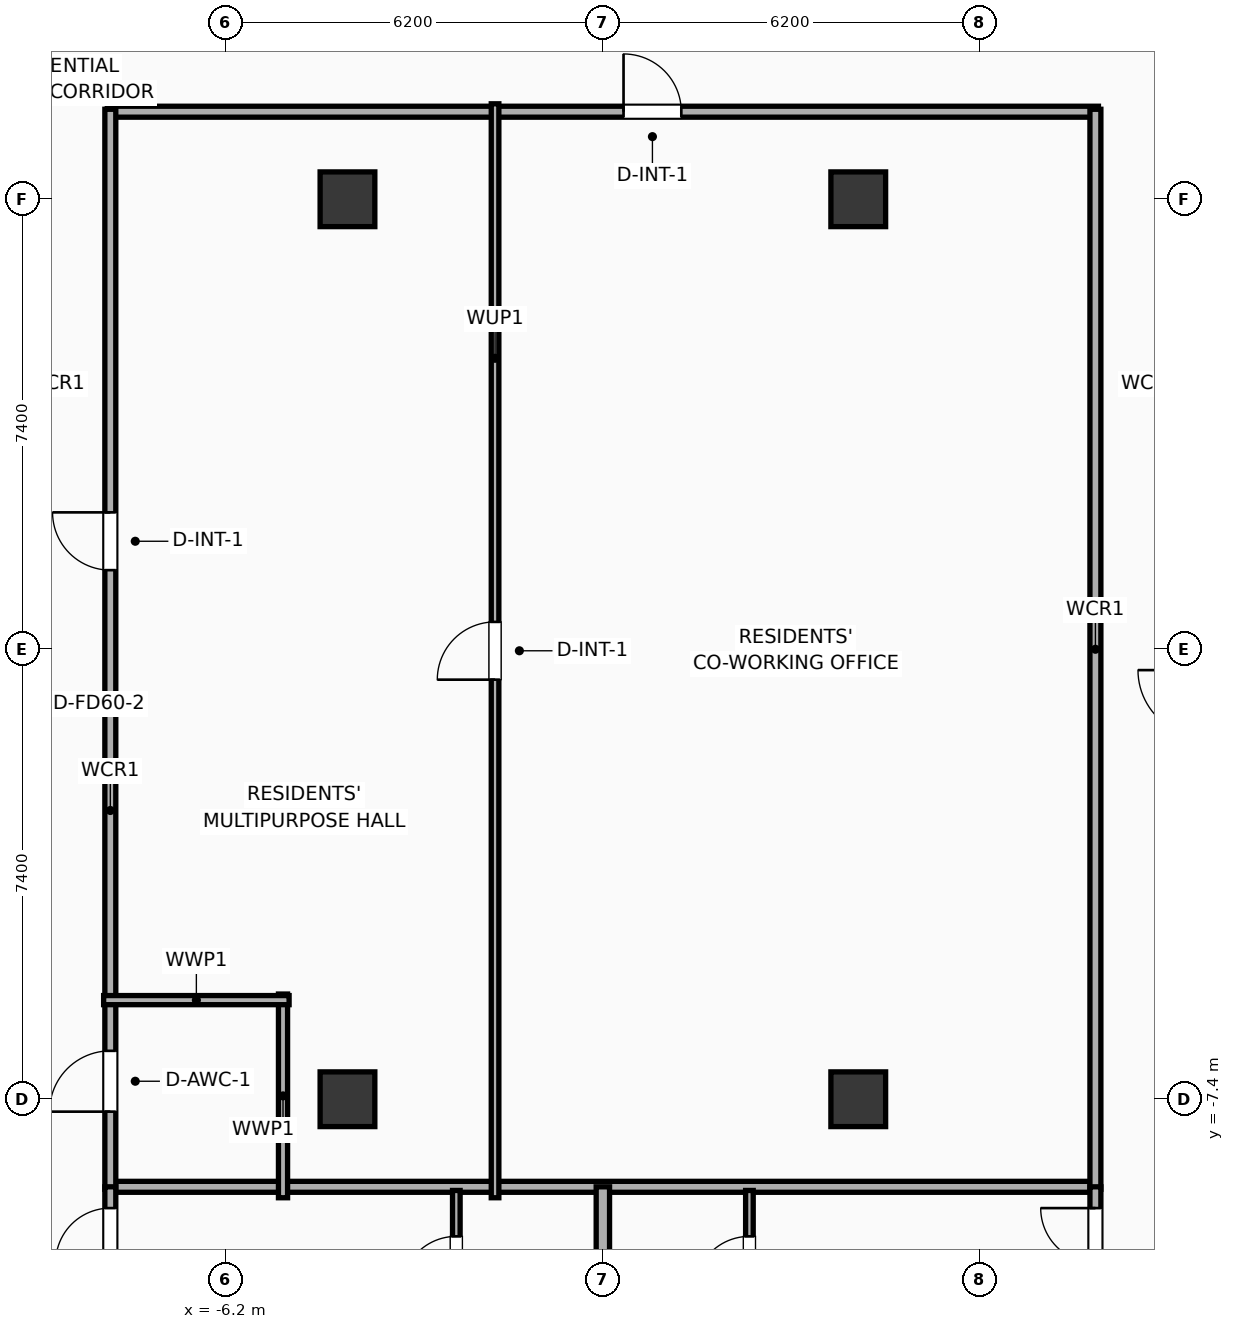
"""IFC4 building model, lengths in metres.
Left out: names, types, materials, properties, quantities, classifications, styles, units other than length and angle.
Written with IfcOpenShell. Run it as: python <this file> out.ifc"""

import sys

from ifc_helpers import new_model, si_unit, direction, frame, frame_2d, origin, origin_2d, place, context, subcontext, project, spatial, rectangle, extrude, element, fill, save


model = new_model("IFC4")
c1 = context("Model", 3, precision=1e-05, world=origin(), true_north=direction((0.0, 1.0)))
c2 = subcontext(c1, "Body", "Model", "MODEL_VIEW")
j1 = project(units=[si_unit("LENGTHUNIT", "METRE"), si_unit("PLANEANGLEUNIT", "RADIAN")], contexts=[c1])
p1 = place(None, origin())
s1 = spatial("IfcSite", under=j1, at=p1, CompositionType="ELEMENT")
p2 = place(p1, origin())
s2 = spatial("IfcBuilding", under=s1, at=p2, CompositionType="ELEMENT")
p3 = place(p2, frame((0.0, 0.0, 239.2)))
s3 = spatial("IfcBuildingStorey", under=s2, at=p3, CompositionType="ELEMENT", Elevation=239.2)
for number, where, z_axis, x_axis in (
    (1, (-4.2, -7.4, 0.0), (0.0, 0.0, 1.0), (1.0, 0.0, 0.0)),
    (2, (-4.2, 7.4, 0.0), (0.0, 0.0, 1.0), (1.0, 0.0, 0.0)),
    (3, (4.2, -7.4, 0.0), (0.0, 0.0, 1.0), (1.0, 0.0, 0.0)),
    (4, (4.2, 7.4, 0.0), (0.0, 0.0, 1.0), (1.0, 0.0, 0.0)),
):
    element("IfcColumn", number, at=place(p3, frame(where, z_axis=z_axis, x_axis=x_axis)), inside=s3, PredefinedType="COLUMN", context=c2, shape_type="SweptSolid", body=[
        extrude(rectangle(XDim=0.9, YDim=0.9, at=origin_2d()), origin(), (0.0, 0.0, 1.0), 3.9),
    ])
p4 = place(p3, frame((-8.15, 8.84, 0.0), z_axis=(0.0, 0.0, 1.0), x_axis=(1.0, 0.0, 0.0)))
e5 = element("IfcWall", 5, at=p4, inside=s3, PredefinedType="PARTITIONING", context=c2, shape_type="SweptSolid", body=[
    extrude(rectangle(XDim=16.3, YDim=0.18, at=frame_2d((8.15, 0.0))), origin(), (0.0, 0.0, 1.0), 3.65),
])
p5 = place(p4, frame((8.49, 0.0, 0.0)))
e6 = element("IfcOpeningElement", 6, at=p5, cuts=e5, PredefinedType="OPENING", context=c2, shape_type="SweptSolid", body=[
    extrude(rectangle(XDim=0.95, YDim=2.05, at=frame_2d((0.475, 1.025))), frame((0.0, 0.1, 0.0), z_axis=(0.0, -1.0, 0.0), x_axis=(1.0, 0.0, 0.0)), (0.0, 0.0, 1.0), 0.2),
])
p6 = place(p3, frame((-8.15, -8.84, 0.0), z_axis=(0.0, 0.0, 1.0), x_axis=(1.0, 0.0, 0.0)))
e7 = element("IfcWall", 7, at=p6, inside=s3, PredefinedType="PARTITIONING", context=c2, shape_type="SweptSolid", body=[
    extrude(rectangle(XDim=16.3, YDim=0.18, at=frame_2d((8.15, 0.0))), origin(), (0.0, 0.0, 1.0), 3.65),
])
p7 = place(p3, frame((-8.1, -8.88, 0.0), z_axis=(0.0, 0.0, 1.0), x_axis=(0.0, 1.0, 0.0)))
e8 = element("IfcWall", 8, at=p7, inside=s3, PredefinedType="PARTITIONING", context=c2, shape_type="SweptSolid", body=[
    extrude(rectangle(XDim=17.76, YDim=0.18, at=frame_2d((8.88, 0.0))), origin(), (0.0, 0.0, 1.0), 3.65),
])
p8 = place(p7, frame((1.276, 0.0, 0.0)))
e9 = element("IfcOpeningElement", 9, at=p8, cuts=e8, PredefinedType="OPENING", context=c2, shape_type="SweptSolid", body=[
    extrude(rectangle(XDim=1.0, YDim=2.05, at=frame_2d((0.5, 1.025))), frame((0.0, 0.1, 0.0), z_axis=(0.0, -1.0, 0.0), x_axis=(1.0, 0.0, 0.0)), (0.0, 0.0, 1.0), 0.2),
])
p9 = place(p7, frame((10.181, 0.0, 0.0)))
e10 = element("IfcOpeningElement", 10, at=p9, cuts=e8, PredefinedType="OPENING", context=c2, shape_type="SweptSolid", body=[
    extrude(rectangle(XDim=0.95, YDim=2.05, at=frame_2d((0.475, 1.025))), frame((0.0, 0.1, 0.0), z_axis=(0.0, -1.0, 0.0), x_axis=(1.0, 0.0, 0.0)), (0.0, 0.0, 1.0), 0.2),
])
p10 = place(p3, frame((8.1, -8.88, 0.0), z_axis=(0.0, 0.0, 1.0), x_axis=(0.0, 1.0, 0.0)))
e11 = element("IfcWall", 11, at=p10, inside=s3, PredefinedType="PARTITIONING", context=c2, shape_type="SweptSolid", body=[
    extrude(rectangle(XDim=17.76, YDim=0.18, at=frame_2d((8.88, 0.0))), origin(), (0.0, 0.0, 1.0), 3.65),
])
p11 = place(p3, frame((-5.26, -9.02, 0.0), z_axis=(0.0, 0.0, 1.0), x_axis=(0.0, 1.0, 0.0)))
e12 = element("IfcWall", 12, at=p11, inside=s3, PredefinedType="PLUMBINGWALL", context=c2, shape_type="SweptSolid", body=[
    extrude(rectangle(XDim=3.35, YDim=0.15, at=frame_2d((1.675, 0.0))), origin(), (0.0, 0.0, 1.0), 3.65),
])
p12 = place(p3, frame((-8.21, -5.77, 0.0), z_axis=(0.0, 0.0, 1.0), x_axis=(1.0, 0.0, 0.0)))
e13 = element("IfcWall", 13, at=p12, inside=s3, PredefinedType="PLUMBINGWALL", context=c2, shape_type="SweptSolid", body=[
    extrude(rectangle(XDim=3.05, YDim=0.15, at=frame_2d((1.525, 0.0))), origin(), (0.0, 0.0, 1.0), 3.65),
])
p13 = place(p3, frame((-1.773, -9.02, 0.0), z_axis=(0.0, 0.0, 1.0), x_axis=(0.0, 1.0, 0.0)))
e14 = element("IfcWall", 14, at=p13, inside=s3, PredefinedType="PARTITIONING", context=c2, shape_type="SweptSolid", body=[
    extrude(rectangle(XDim=17.99, YDim=0.125, at=frame_2d((8.995, 0.0))), origin(), (0.0, 0.0, 1.0), 3.65),
])
p14 = place(p13, frame((8.52, 0.0, 0.0)))
e15 = element("IfcOpeningElement", 15, at=p14, cuts=e14, PredefinedType="OPENING", context=c2, shape_type="SweptSolid", body=[
    extrude(rectangle(XDim=0.95, YDim=2.05, at=frame_2d((0.475, 1.025))), frame((0.0, 0.073, 0.0), z_axis=(0.0, -1.0, 0.0), x_axis=(1.0, 0.0, 0.0)), (0.0, 0.0, 1.0), 0.145),
])
p15 = place(p3, frame((-2.41, -11.31, 0.0), z_axis=(0.0, 0.0, 1.0), x_axis=(0.0, 1.0, 0.0)))
e16 = element("IfcWall", 16, at=p15, inside=s3, PredefinedType="PARTITIONING", context=c2, shape_type="SweptSolid", body=[
    extrude(rectangle(XDim=2.41, YDim=0.125, at=frame_2d((1.205, 0.0))), origin(), (0.0, 0.0, 1.0), 3.65),
])
p16 = place(p15, frame((0.755, 0.0, 0.0)))
e17 = element("IfcOpeningElement", 17, at=p16, cuts=e16, PredefinedType="OPENING", context=c2, shape_type="SweptSolid", body=[
    extrude(rectangle(XDim=0.9, YDim=2.05, at=frame_2d((0.45, 1.025))), frame((0.0, 0.073, 0.0), z_axis=(0.0, -1.0, 0.0), x_axis=(1.0, 0.0, 0.0)), (0.0, 0.0, 1.0), 0.145),
])
p17 = place(p3, frame((-8.1, -18.83, 0.0), z_axis=(0.0, 0.0, 1.0), x_axis=(0.0, 1.0, 0.0)))
e18 = element("IfcWall", 18, at=p17, inside=s3, PredefinedType="PARTITIONING", context=c2, shape_type="SweptSolid", body=[
    extrude(rectangle(XDim=9.99, YDim=0.18, at=frame_2d((4.995, 0.0))), origin(), (0.0, 0.0, 1.0), 3.65),
])
p18 = place(p17, frame((8.74, 0.0, 0.0)))
e19 = element("IfcOpeningElement", 19, at=p18, cuts=e18, PredefinedType="OPENING", context=c2, shape_type="SweptSolid", body=[
    extrude(rectangle(XDim=0.9, YDim=2.05, at=frame_2d((0.45, 1.025))), frame((0.0, 0.1, 0.0), z_axis=(0.0, -1.0, 0.0), x_axis=(1.0, 0.0, 0.0)), (0.0, 0.0, 1.0), 0.2),
])
p19 = place(p3, frame((2.41, -11.31, 0.0), z_axis=(0.0, 0.0, 1.0), x_axis=(0.0, 1.0, 0.0)))
e20 = element("IfcWall", 20, at=p19, inside=s3, PredefinedType="PARTITIONING", context=c2, shape_type="SweptSolid", body=[
    extrude(rectangle(XDim=2.41, YDim=0.125, at=frame_2d((1.205, 0.0))), origin(), (0.0, 0.0, 1.0), 3.65),
])
p20 = place(p19, frame((0.755, 0.0, 0.0)))
e21 = element("IfcOpeningElement", 21, at=p20, cuts=e20, PredefinedType="OPENING", context=c2, shape_type="SweptSolid", body=[
    extrude(rectangle(XDim=0.9, YDim=2.05, at=frame_2d((0.45, 1.025))), frame((0.0, 0.073, 0.0), z_axis=(0.0, -1.0, 0.0), x_axis=(1.0, 0.0, 0.0)), (0.0, 0.0, 1.0), 0.145),
])
p21 = place(p3, frame((8.1, -18.83, 0.0), z_axis=(0.0, 0.0, 1.0), x_axis=(0.0, 1.0, 0.0)))
e22 = element("IfcWall", 22, at=p21, inside=s3, PredefinedType="PARTITIONING", context=c2, shape_type="SweptSolid", body=[
    extrude(rectangle(XDim=9.99, YDim=0.18, at=frame_2d((4.995, 0.0))), origin(), (0.0, 0.0, 1.0), 3.65),
])
p22 = place(p21, frame((8.74, 0.0, 0.0)))
e23 = element("IfcOpeningElement", 23, at=p22, cuts=e22, PredefinedType="OPENING", context=c2, shape_type="SweptSolid", body=[
    extrude(rectangle(XDim=0.9, YDim=2.05, at=frame_2d((0.45, 1.025))), frame((0.0, 0.1, 0.0), z_axis=(0.0, -1.0, 0.0), x_axis=(1.0, 0.0, 0.0)), (0.0, 0.0, 1.0), 0.2),
])
p23 = place(p3, frame((0.0, -18.83, 0.0), z_axis=(0.0, 0.0, 1.0), x_axis=(0.0, 1.0, 0.0)))
e24 = element("IfcWall", 24, at=p23, inside=s3, PredefinedType="PARTITIONING", context=c2, shape_type="SweptSolid", body=[
    extrude(rectangle(XDim=9.99, YDim=0.22, at=frame_2d((4.995, 0.0))), origin(), (0.0, 0.0, 1.0), 3.65),
])
p24 = place(p5, origin())
e25 = element("IfcDoor", 25, at=p24, inside=s3, OperationType="SINGLE_SWING_LEFT", PredefinedType="DOOR", context=c2, shape_type="SweptSolid", body=[
    extrude(rectangle(XDim=0.95, YDim=2.05, at=frame_2d((0.475, 1.025))), frame((0.0, 0.025, 0.0), z_axis=(0.0, -1.0, 0.0), x_axis=(1.0, 0.0, 0.0)), (0.0, 0.0, 1.0), 0.05),
])
fill(e6, e25)
p25 = place(p8, origin())
e26 = element("IfcDoor", 26, at=p25, inside=s3, OperationType="SINGLE_SWING_LEFT", PredefinedType="DOOR", context=c2, shape_type="SweptSolid", body=[
    extrude(rectangle(XDim=1.0, YDim=2.05, at=frame_2d((0.5, 1.025))), frame((0.0, 0.025, 0.0), z_axis=(0.0, -1.0, 0.0), x_axis=(1.0, 0.0, 0.0)), (0.0, 0.0, 1.0), 0.05),
])
fill(e9, e26)
p26 = place(p9, origin())
e27 = element("IfcDoor", 27, at=p26, inside=s3, OperationType="SINGLE_SWING_RIGHT", PredefinedType="DOOR", context=c2, shape_type="SweptSolid", body=[
    extrude(rectangle(XDim=0.95, YDim=2.05, at=frame_2d((0.475, 1.025))), frame((0.0, 0.025, 0.0), z_axis=(0.0, -1.0, 0.0), x_axis=(1.0, 0.0, 0.0)), (0.0, 0.0, 1.0), 0.05),
])
fill(e10, e27)
p27 = place(p14, origin())
e28 = element("IfcDoor", 28, at=p27, inside=s3, OperationType="SINGLE_SWING_LEFT", PredefinedType="DOOR", context=c2, shape_type="SweptSolid", body=[
    extrude(rectangle(XDim=0.95, YDim=2.05, at=frame_2d((0.475, 1.025))), frame((0.0, 0.025, 0.0), z_axis=(0.0, -1.0, 0.0), x_axis=(1.0, 0.0, 0.0)), (0.0, 0.0, 1.0), 0.05),
])
fill(e15, e28)
p28 = place(p16, origin())
e29 = element("IfcDoor", 29, at=p28, inside=s3, OperationType="SINGLE_SWING_LEFT", PredefinedType="DOOR", context=c2, shape_type="SweptSolid", body=[
    extrude(rectangle(XDim=0.9, YDim=2.05, at=frame_2d((0.45, 1.025))), frame((0.0, 0.025, 0.0), z_axis=(0.0, -1.0, 0.0), x_axis=(1.0, 0.0, 0.0)), (0.0, 0.0, 1.0), 0.05),
])
fill(e17, e29)
p29 = place(p18, origin())
e30 = element("IfcDoor", 30, at=p29, inside=s3, OperationType="SINGLE_SWING_LEFT", PredefinedType="DOOR", context=c2, shape_type="SweptSolid", body=[
    extrude(rectangle(XDim=0.9, YDim=2.05, at=frame_2d((0.45, 1.025))), frame((0.0, 0.025, 0.0), z_axis=(0.0, -1.0, 0.0), x_axis=(1.0, 0.0, 0.0)), (0.0, 0.0, 1.0), 0.05),
])
fill(e19, e30)
p30 = place(p20, origin())
e31 = element("IfcDoor", 31, at=p30, inside=s3, OperationType="SINGLE_SWING_LEFT", PredefinedType="DOOR", context=c2, shape_type="SweptSolid", body=[
    extrude(rectangle(XDim=0.9, YDim=2.05, at=frame_2d((0.45, 1.025))), frame((0.0, 0.025, 0.0), z_axis=(0.0, -1.0, 0.0), x_axis=(1.0, 0.0, 0.0)), (0.0, 0.0, 1.0), 0.05),
])
fill(e21, e31)
p31 = place(p22, origin())
e32 = element("IfcDoor", 32, at=p31, inside=s3, OperationType="SINGLE_SWING_RIGHT", PredefinedType="DOOR", context=c2, shape_type="SweptSolid", body=[
    extrude(rectangle(XDim=0.9, YDim=2.05, at=frame_2d((0.45, 1.025))), frame((0.0, 0.025, 0.0), z_axis=(0.0, -1.0, 0.0), x_axis=(1.0, 0.0, 0.0)), (0.0, 0.0, 1.0), 0.05),
])
fill(e23, e32)
save(model, sys.argv[1])
